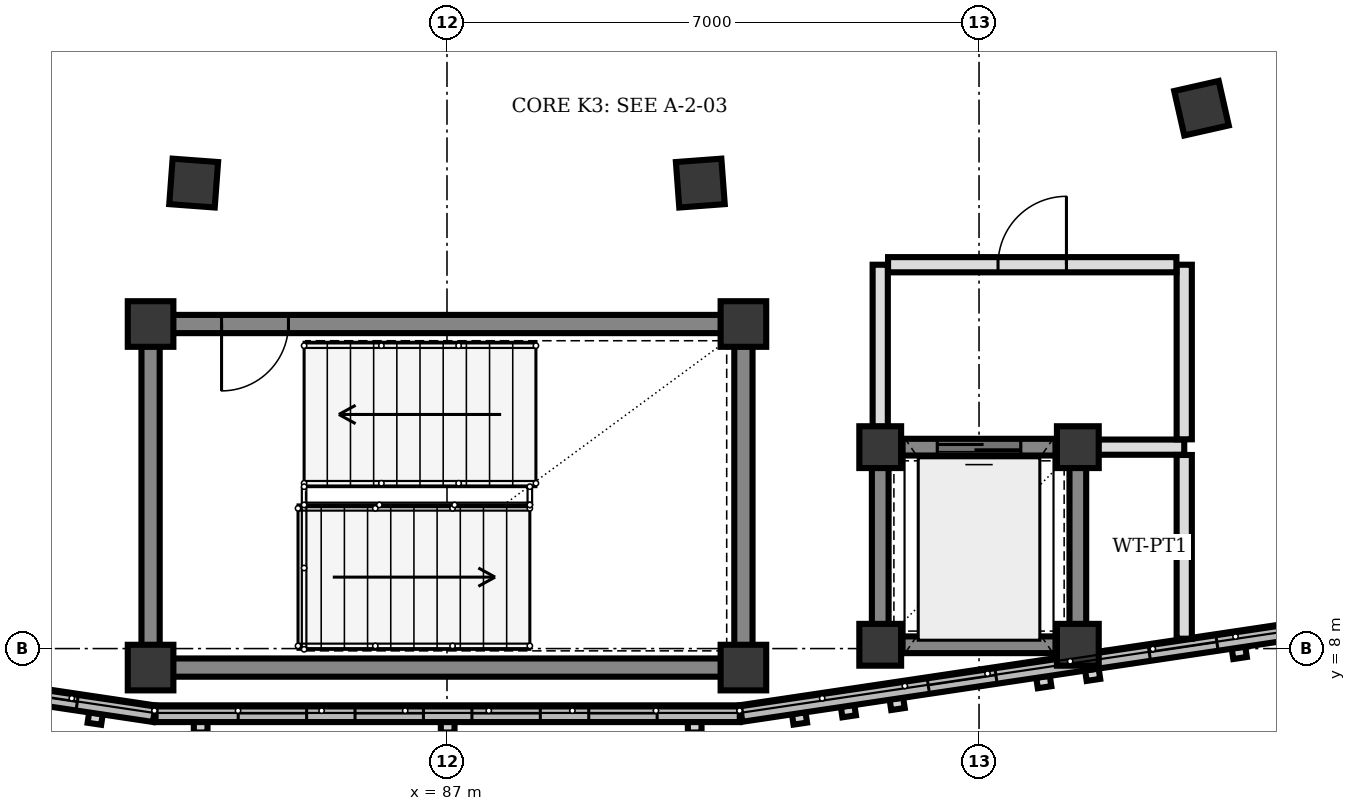
"""IFC4 building model, lengths in metres.
Left out: names, types, materials, properties, quantities, classifications, styles, units other than length and angle.
Written with IfcOpenShell. Run it as: python <this file> out.ifc"""

import sys

from ifc_helpers import new_model, si_unit, direction, frame, frame_2d, origin, origin_2d, place, context, subcontext, project, spatial, rectangle, extrude, element, fill, save


model = new_model("IFC4")
c1 = context("Model", 3, precision=1e-05, world=origin(), true_north=direction((0.0, 1.0)))
c2 = subcontext(c1, "Body", "Model", "MODEL_VIEW")
j1 = project(units=[si_unit("LENGTHUNIT", "METRE"), si_unit("PLANEANGLEUNIT", "RADIAN")], contexts=[c1])
p1 = place(None, origin())
s1 = spatial("IfcSite", under=j1, at=p1, CompositionType="ELEMENT")
p2 = place(p1, origin())
s2 = spatial("IfcBuilding", under=s1, at=p2, CompositionType="ELEMENT")
p3 = place(p2, frame((0.0, 0.0, 4.5)))
s3 = spatial("IfcBuildingStorey", under=s2, at=p3, CompositionType="ELEMENT", Elevation=4.5)
for number, where, z_axis, x_axis in (
    (1, (83.1, 7.75, 0.0), (0.0, 0.0, 1.0), (1.0, 0.0, 0.0)),
    (2, (90.9, 7.75, 0.0), (0.0, 0.0, 1.0), (1.0, 0.0, 0.0)),
    (3, (90.9, 12.27, 0.0), (0.0, 0.0, 1.0), (1.0, 0.0, 0.0)),
    (4, (83.1, 12.27, 0.0), (0.0, 0.0, 1.0), (1.0, 0.0, 0.0)),
):
    element("IfcColumn", number, at=place(p3, frame(where, z_axis=z_axis, x_axis=x_axis)), inside=s3, PredefinedType="COLUMN", context=c2, shape_type="SweptSolid", body=[
        extrude(rectangle(XDim=0.6, YDim=0.6, at=origin_2d()), origin(), (0.0, 0.0, 1.0), 4.0),
    ])
for number, where, z_axis, x_axis in (
    (5, (92.7, 8.05, 0.0), (0.0, 0.0, 1.0), (1.0, 0.0, 0.0)),
    (6, (95.3, 8.05, 0.0), (0.0, 0.0, 1.0), (1.0, 0.0, 0.0)),
    (7, (95.3, 10.65, 0.0), (0.0, 0.0, 1.0), (1.0, 0.0, 0.0)),
    (8, (92.7, 10.65, 0.0), (0.0, 0.0, 1.0), (1.0, 0.0, 0.0)),
):
    element("IfcColumn", number, at=place(p3, frame(where, z_axis=z_axis, x_axis=x_axis)), inside=s3, PredefinedType="COLUMN", context=c2, shape_type="SweptSolid", body=[
        extrude(rectangle(XDim=0.55, YDim=0.55, at=origin_2d()), origin(), (0.0, 0.0, 1.0), 4.0),
    ])
for number, where, z_axis, x_axis in (
    (9, (83.667, 14.124, 0.0), (0.0, 0.0, 1.0), (-0.074, -0.997, 0.0)),
    (10, (90.333, 14.124, 0.0), (0.0, 0.0, 1.0), (0.074, -0.997, 0.0)),
    (11, (96.927, 15.109, 0.0), (0.0, 0.0, 1.0), (0.221, -0.975, 0.0)),
):
    element("IfcColumn", number, at=place(p3, frame(where, z_axis=z_axis, x_axis=x_axis)), inside=s3, PredefinedType="COLUMN", context=c2, shape_type="SweptSolid", body=[
        extrude(rectangle(XDim=0.6, YDim=0.6, at=origin_2d()), origin(), (0.0, 0.0, 1.0), 4.0),
    ])
p4 = place(p3, frame((83.148, 7.143, 0.0), z_axis=(0.0, 0.0, 1.0), x_axis=(-0.989038445117, 0.147658234042, 0.0)))
e12 = element("IfcWall", 12, at=p4, inside=s3, PredefinedType="SOLIDWALL", context=c2, shape_type="SweptSolid", body=[
    extrude(rectangle(XDim=7.368, YDim=0.22, at=frame_2d((3.684, 0.0))), origin(), (0.0, 0.0, 1.0), 3.55),
])
p5 = place(p4, frame((1.024, 0.0, 0.85)))
e13 = element("IfcOpeningElement", 13, at=p5, cuts=e12, PredefinedType="OPENING", context=c2, shape_type="SweptSolid", body=[
    extrude(rectangle(XDim=0.9, YDim=1.4, at=frame_2d((0.45, 0.7))), frame((0.0, 0.12, 0.0), z_axis=(0.0, -1.0, 0.0), x_axis=(1.0, 0.0, 0.0)), (0.0, 0.0, 1.0), 0.24),
])
p6 = place(p4, frame((2.497, 0.0, 0.85)))
e14 = element("IfcOpeningElement", 14, at=p6, cuts=e12, PredefinedType="OPENING", context=c2, shape_type="SweptSolid", body=[
    extrude(rectangle(XDim=0.9, YDim=1.4, at=frame_2d((0.45, 0.7))), frame((0.0, 0.12, 0.0), z_axis=(0.0, -1.0, 0.0), x_axis=(1.0, 0.0, 0.0)), (0.0, 0.0, 1.0), 0.24),
])
p7 = place(p4, frame((3.971, 0.0, 0.85)))
e15 = element("IfcOpeningElement", 15, at=p7, cuts=e12, PredefinedType="OPENING", context=c2, shape_type="SweptSolid", body=[
    extrude(rectangle(XDim=0.9, YDim=1.4, at=frame_2d((0.45, 0.7))), frame((0.0, 0.12, 0.0), z_axis=(0.0, -1.0, 0.0), x_axis=(1.0, 0.0, 0.0)), (0.0, 0.0, 1.0), 0.24),
])
p8 = place(p4, frame((5.444, 0.0, 0.85)))
e16 = element("IfcOpeningElement", 16, at=p8, cuts=e12, PredefinedType="OPENING", context=c2, shape_type="SweptSolid", body=[
    extrude(rectangle(XDim=0.9, YDim=1.4, at=frame_2d((0.45, 0.7))), frame((0.0, 0.12, 0.0), z_axis=(0.0, -1.0, 0.0), x_axis=(1.0, 0.0, 0.0)), (0.0, 0.0, 1.0), 0.24),
])
p9 = place(p3, frame((90.852, 7.143, 0.0), z_axis=(0.0, 0.0, 1.0), x_axis=(-1.0, 0.0, 0.0)))
e17 = element("IfcWall", 17, at=p9, inside=s3, PredefinedType="SOLIDWALL", context=c2, shape_type="SweptSolid", body=[
    extrude(rectangle(XDim=7.686, YDim=0.22, at=frame_2d((3.843, 0.0))), origin(), (0.0, 0.0, 1.0), 3.55),
])
p10 = place(p9, frame((1.087, 0.0, 0.85)))
e18 = element("IfcOpeningElement", 18, at=p10, cuts=e17, PredefinedType="OPENING", context=c2, shape_type="SweptSolid", body=[
    extrude(rectangle(XDim=0.9, YDim=1.4, at=frame_2d((0.45, 0.7))), frame((0.0, 0.12, 0.0), z_axis=(0.0, -1.0, 0.0), x_axis=(1.0, 0.0, 0.0)), (0.0, 0.0, 1.0), 0.24),
])
p11 = place(p9, frame((2.624, 0.0, 0.85)))
e19 = element("IfcOpeningElement", 19, at=p11, cuts=e17, PredefinedType="OPENING", context=c2, shape_type="SweptSolid", body=[
    extrude(rectangle(XDim=0.9, YDim=1.4, at=frame_2d((0.45, 0.7))), frame((0.0, 0.12, 0.0), z_axis=(0.0, -1.0, 0.0), x_axis=(1.0, 0.0, 0.0)), (0.0, 0.0, 1.0), 0.24),
])
p12 = place(p9, frame((4.162, 0.0, 0.85)))
e20 = element("IfcOpeningElement", 20, at=p12, cuts=e17, PredefinedType="OPENING", context=c2, shape_type="SweptSolid", body=[
    extrude(rectangle(XDim=0.9, YDim=1.4, at=frame_2d((0.45, 0.7))), frame((0.0, 0.12, 0.0), z_axis=(0.0, -1.0, 0.0), x_axis=(1.0, 0.0, 0.0)), (0.0, 0.0, 1.0), 0.24),
])
p13 = place(p9, frame((5.699, 0.0, 0.85)))
e21 = element("IfcOpeningElement", 21, at=p13, cuts=e17, PredefinedType="OPENING", context=c2, shape_type="SweptSolid", body=[
    extrude(rectangle(XDim=0.9, YDim=1.4, at=frame_2d((0.45, 0.7))), frame((0.0, 0.12, 0.0), z_axis=(0.0, -1.0, 0.0), x_axis=(1.0, 0.0, 0.0)), (0.0, 0.0, 1.0), 0.24),
])
p14 = place(p3, frame((98.139, 8.231, 0.0), z_axis=(0.0, 0.0, 1.0), x_axis=(-0.989043064047, -0.1476272924, 0.0)))
e22 = element("IfcWall", 22, at=p14, inside=s3, PredefinedType="SOLIDWALL", context=c2, shape_type="SweptSolid", body=[
    extrude(rectangle(XDim=7.349, YDim=0.22, at=frame_2d((3.675, 0.0))), origin(), (0.0, 0.0, 1.0), 3.55),
])
p15 = place(p14, frame((1.02, 0.0, 0.85)))
e23 = element("IfcOpeningElement", 23, at=p15, cuts=e22, PredefinedType="OPENING", context=c2, shape_type="SweptSolid", body=[
    extrude(rectangle(XDim=0.9, YDim=1.4, at=frame_2d((0.45, 0.7))), frame((0.0, 0.12, 0.0), z_axis=(0.0, -1.0, 0.0), x_axis=(1.0, 0.0, 0.0)), (0.0, 0.0, 1.0), 0.24),
])
p16 = place(p14, frame((3.96, 0.0, 0.85)))
e24 = element("IfcOpeningElement", 24, at=p16, cuts=e22, PredefinedType="OPENING", context=c2, shape_type="SweptSolid", body=[
    extrude(rectangle(XDim=0.9, YDim=1.4, at=frame_2d((0.45, 0.7))), frame((0.0, 0.12, 0.0), z_axis=(0.0, -1.0, 0.0), x_axis=(1.0, 0.0, 0.0)), (0.0, 0.0, 1.0), 0.24),
])
for number, where, z_axis, x_axis in (
    (25, (83.1, 8.042, 0.0), (0.0, 0.0, 1.0), (0.0, 1.0, 0.0)),
    (26, (90.9, 11.978, 0.0), (0.0, 0.0, 1.0), (0.0, -1.0, 0.0)),
):
    element("IfcWall", number, at=place(p3, frame(where, z_axis=z_axis, x_axis=x_axis)), inside=s3, PredefinedType="SHEAR", context=c2, shape_type="SweptSolid", body=[
        extrude(rectangle(XDim=3.936, YDim=0.24, at=frame_2d((1.968, 0.0))), origin(), (0.0, 0.0, 1.0), 3.74),
    ])
p17 = place(p3, frame((90.608, 7.75, 0.0), z_axis=(0.0, 0.0, 1.0), x_axis=(-1.0, 0.0, 0.0)))
e27 = element("IfcWall", 27, at=p17, inside=s3, PredefinedType="SHEAR", context=c2, shape_type="SweptSolid", body=[
    extrude(rectangle(XDim=7.216, YDim=0.24, at=frame_2d((3.608, 0.0))), origin(), (0.0, 0.0, 1.0), 3.74),
])
p18 = place(p3, frame((90.608, 12.27, 0.0), z_axis=(0.0, 0.0, 1.0), x_axis=(-1.0, 0.0, 0.0)))
e28 = element("IfcWall", 28, at=p18, inside=s3, PredefinedType="SHEAR", context=c2, shape_type="SweptSolid", body=[
    extrude(rectangle(XDim=7.216, YDim=0.24, at=frame_2d((3.608, 0.0))), origin(), (0.0, 0.0, 1.0), 3.74),
])
p19 = place(p18, frame((5.694, 0.0, 0.0)))
e29 = element("IfcOpeningElement", 29, at=p19, cuts=e28, PredefinedType="OPENING", context=c2, shape_type="SweptSolid", body=[
    extrude(rectangle(XDim=0.88, YDim=2.1, at=frame_2d((0.44, 1.05))), frame((0.0, 0.13, 0.0), z_axis=(0.0, -1.0, 0.0), x_axis=(1.0, 0.0, 0.0)), (0.0, 0.0, 1.0), 0.26),
])
p20 = place(p3, frame((92.967, 8.05, 0.0), z_axis=(0.0, 0.0, 1.0), x_axis=(1.0, 0.0, 0.0)))
e30 = element("IfcWall", 30, at=p20, inside=s3, PredefinedType="SHEAR", context=c2, shape_type="SweptSolid", body=[
    extrude(rectangle(XDim=2.066, YDim=0.22, at=frame_2d((1.033, 0.0))), origin(), (0.0, 0.0, 1.0), 3.74),
])
p21 = place(p3, frame((95.3, 8.317, 0.0), z_axis=(0.0, 0.0, 1.0), x_axis=(0.0, 1.0, 0.0)))
e31 = element("IfcWall", 31, at=p21, inside=s3, PredefinedType="SHEAR", context=c2, shape_type="SweptSolid", body=[
    extrude(rectangle(XDim=2.066, YDim=0.22, at=frame_2d((1.033, 0.0))), origin(), (0.0, 0.0, 1.0), 3.74),
])
p22 = place(p3, frame((95.033, 10.65, 0.0), z_axis=(0.0, 0.0, 1.0), x_axis=(-1.0, 0.0, 0.0)))
e32 = element("IfcWall", 32, at=p22, inside=s3, PredefinedType="SHEAR", context=c2, shape_type="SweptSolid", body=[
    extrude(rectangle(XDim=2.066, YDim=0.22, at=frame_2d((1.033, 0.0))), origin(), (0.0, 0.0, 1.0), 3.74),
])
p23 = place(p22, frame((0.483, 0.0, 0.0)))
e33 = element("IfcOpeningElement", 33, at=p23, cuts=e32, PredefinedType="OPENING", context=c2, shape_type="SweptSolid", body=[
    extrude(rectangle(XDim=1.1, YDim=2.15, at=frame_2d((0.55, 1.075))), frame((0.0, 0.12, 0.0), z_axis=(0.0, -1.0, 0.0), x_axis=(1.0, 0.0, 0.0)), (0.0, 0.0, 1.0), 0.24),
])
p24 = place(p3, frame((92.7, 10.383, 0.0), z_axis=(0.0, 0.0, 1.0), x_axis=(0.0, -1.0, 0.0)))
e34 = element("IfcWall", 34, at=p24, inside=s3, PredefinedType="SHEAR", context=c2, shape_type="SweptSolid", body=[
    extrude(rectangle(XDim=2.066, YDim=0.22, at=frame_2d((1.033, 0.0))), origin(), (0.0, 0.0, 1.0), 3.74),
])
p25 = place(p3, frame((92.7, 10.917, 0.0), z_axis=(0.0, 0.0, 1.0), x_axis=(0.0, 1.0, 0.0)))
e35 = element("IfcWall", 35, at=p25, inside=s3, PredefinedType="PARTITIONING", context=c2, shape_type="SweptSolid", body=[
    extrude(rectangle(XDim=2.133, YDim=0.2, at=frame_2d((1.066, 0.0))), origin(), (0.0, 0.0, 1.0), 3.7),
])
p26 = place(p3, frame((95.567, 10.65, 0.0), z_axis=(0.0, 0.0, 1.0), x_axis=(1.0, 0.0, 0.0)))
e36 = element("IfcWall", 36, at=p26, inside=s3, PredefinedType="PARTITIONING", context=c2, shape_type="SweptSolid", body=[
    extrude(rectangle(XDim=1.133, YDim=0.2, at=frame_2d((0.566, 0.0))), origin(), (0.0, 0.0, 1.0), 3.7),
])
p27 = place(p3, frame((96.7, 8.13, 0.0), z_axis=(0.0, 0.0, 1.0), x_axis=(0.0, 1.0, 0.0)))
e37 = element("IfcWall", 37, at=p27, inside=s3, PredefinedType="PARTITIONING", context=c2, shape_type="SweptSolid", body=[
    extrude(rectangle(XDim=2.417, YDim=0.2, at=frame_2d((1.208, 0.0))), origin(), (0.0, 0.0, 1.0), 3.7),
])
p28 = place(p3, frame((96.7, 10.753, 0.0), z_axis=(0.0, 0.0, 1.0), x_axis=(0.0, 1.0, 0.0)))
e38 = element("IfcWall", 38, at=p28, inside=s3, PredefinedType="PARTITIONING", context=c2, shape_type="SweptSolid", body=[
    extrude(rectangle(XDim=2.297, YDim=0.2, at=frame_2d((1.148, 0.0))), origin(), (0.0, 0.0, 1.0), 3.7),
])
p29 = place(p3, frame((92.803, 13.05, 0.0), z_axis=(0.0, 0.0, 1.0), x_axis=(1.0, 0.0, 0.0)))
e39 = element("IfcWall", 39, at=p29, inside=s3, PredefinedType="PARTITIONING", context=c2, shape_type="SweptSolid", body=[
    extrude(rectangle(XDim=3.794, YDim=0.2, at=frame_2d((1.897, 0.0))), origin(), (0.0, 0.0, 1.0), 3.7),
])
p30 = place(p29, frame((1.447, 0.0, 0.0)))
e40 = element("IfcOpeningElement", 40, at=p30, cuts=e39, PredefinedType="OPENING", context=c2, shape_type="SweptSolid", body=[
    extrude(rectangle(XDim=0.9, YDim=2.2, at=frame_2d((0.45, 1.1))), frame((0.0, 0.11, 0.0), z_axis=(0.0, -1.0, 0.0), x_axis=(1.0, 0.0, 0.0)), (0.0, 0.0, 1.0), 0.22),
])
p31 = place(p5, origin())
e41 = element("IfcWindow", 41, at=p31, inside=s3, PartitioningType="SINGLE_PANEL", PredefinedType="WINDOW", context=c2, shape_type="SweptSolid", body=[
    extrude(rectangle(XDim=0.9, YDim=1.4, at=frame_2d((0.45, 0.7))), frame((0.0, 0.03, 0.0), z_axis=(0.0, -1.0, 0.0), x_axis=(1.0, 0.0, 0.0)), (0.0, 0.0, 1.0), 0.06),
])
fill(e13, e41)
p32 = place(p10, origin())
e42 = element("IfcWindow", 42, at=p32, inside=s3, PartitioningType="SINGLE_PANEL", PredefinedType="WINDOW", context=c2, shape_type="SweptSolid", body=[
    extrude(rectangle(XDim=0.9, YDim=1.4, at=frame_2d((0.45, 0.7))), frame((0.0, 0.03, 0.0), z_axis=(0.0, -1.0, 0.0), x_axis=(1.0, 0.0, 0.0)), (0.0, 0.0, 1.0), 0.06),
])
fill(e18, e42)
p33 = place(p11, origin())
e43 = element("IfcWindow", 43, at=p33, inside=s3, PartitioningType="SINGLE_PANEL", PredefinedType="WINDOW", context=c2, shape_type="SweptSolid", body=[
    extrude(rectangle(XDim=0.9, YDim=1.4, at=frame_2d((0.45, 0.7))), frame((0.0, 0.03, 0.0), z_axis=(0.0, -1.0, 0.0), x_axis=(1.0, 0.0, 0.0)), (0.0, 0.0, 1.0), 0.06),
])
fill(e19, e43)
p34 = place(p12, origin())
e44 = element("IfcWindow", 44, at=p34, inside=s3, PartitioningType="SINGLE_PANEL", PredefinedType="WINDOW", context=c2, shape_type="SweptSolid", body=[
    extrude(rectangle(XDim=0.9, YDim=1.4, at=frame_2d((0.45, 0.7))), frame((0.0, 0.03, 0.0), z_axis=(0.0, -1.0, 0.0), x_axis=(1.0, 0.0, 0.0)), (0.0, 0.0, 1.0), 0.06),
])
fill(e20, e44)
p35 = place(p13, origin())
e45 = element("IfcWindow", 45, at=p35, inside=s3, PartitioningType="SINGLE_PANEL", PredefinedType="WINDOW", context=c2, shape_type="SweptSolid", body=[
    extrude(rectangle(XDim=0.9, YDim=1.4, at=frame_2d((0.45, 0.7))), frame((0.0, 0.03, 0.0), z_axis=(0.0, -1.0, 0.0), x_axis=(1.0, 0.0, 0.0)), (0.0, 0.0, 1.0), 0.06),
])
fill(e21, e45)
p36 = place(p15, origin())
e46 = element("IfcWindow", 46, at=p36, inside=s3, PartitioningType="SINGLE_PANEL", PredefinedType="WINDOW", context=c2, shape_type="SweptSolid", body=[
    extrude(rectangle(XDim=0.9, YDim=1.4, at=frame_2d((0.45, 0.7))), frame((0.0, 0.03, 0.0), z_axis=(0.0, -1.0, 0.0), x_axis=(1.0, 0.0, 0.0)), (0.0, 0.0, 1.0), 0.06),
])
fill(e23, e46)
p37 = place(p16, origin())
e47 = element("IfcWindow", 47, at=p37, inside=s3, PartitioningType="SINGLE_PANEL", PredefinedType="WINDOW", context=c2, shape_type="SweptSolid", body=[
    extrude(rectangle(XDim=0.9, YDim=1.4, at=frame_2d((0.45, 0.7))), frame((0.0, 0.03, 0.0), z_axis=(0.0, -1.0, 0.0), x_axis=(1.0, 0.0, 0.0)), (0.0, 0.0, 1.0), 0.06),
])
fill(e24, e47)
p38 = place(p19, origin())
e48 = element("IfcDoor", 48, at=p38, inside=s3, OperationType="SINGLE_SWING_RIGHT", PredefinedType="DOOR", context=c2, shape_type="SweptSolid", body=[
    extrude(rectangle(XDim=0.88, YDim=2.1, at=frame_2d((0.44, 1.05))), frame((0.0, 0.025, 0.0), z_axis=(0.0, -1.0, 0.0), x_axis=(1.0, 0.0, 0.0)), (0.0, 0.0, 1.0), 0.05),
])
fill(e29, e48)
p39 = place(p23, origin())
e49 = element("IfcDoor", 49, at=p39, inside=s3, OperationType="DOUBLE_DOOR_SLIDING", PredefinedType="DOOR", context=c2, shape_type="SweptSolid", body=[
    extrude(rectangle(XDim=1.1, YDim=2.15, at=frame_2d((0.55, 1.075))), frame((0.0, 0.025, 0.0), z_axis=(0.0, -1.0, 0.0), x_axis=(1.0, 0.0, 0.0)), (0.0, 0.0, 1.0), 0.05),
])
fill(e33, e49)
p40 = place(p30, origin())
e50 = element("IfcDoor", 50, at=p40, inside=s3, OperationType="SINGLE_SWING_RIGHT", PredefinedType="DOOR", context=c2, shape_type="SweptSolid", body=[
    extrude(rectangle(XDim=0.9, YDim=2.2, at=frame_2d((0.45, 1.1))), frame((0.0, 0.025, 0.0), z_axis=(0.0, -1.0, 0.0), x_axis=(1.0, 0.0, 0.0)), (0.0, 0.0, 1.0), 0.05),
])
fill(e40, e50)
save(model, sys.argv[1])
